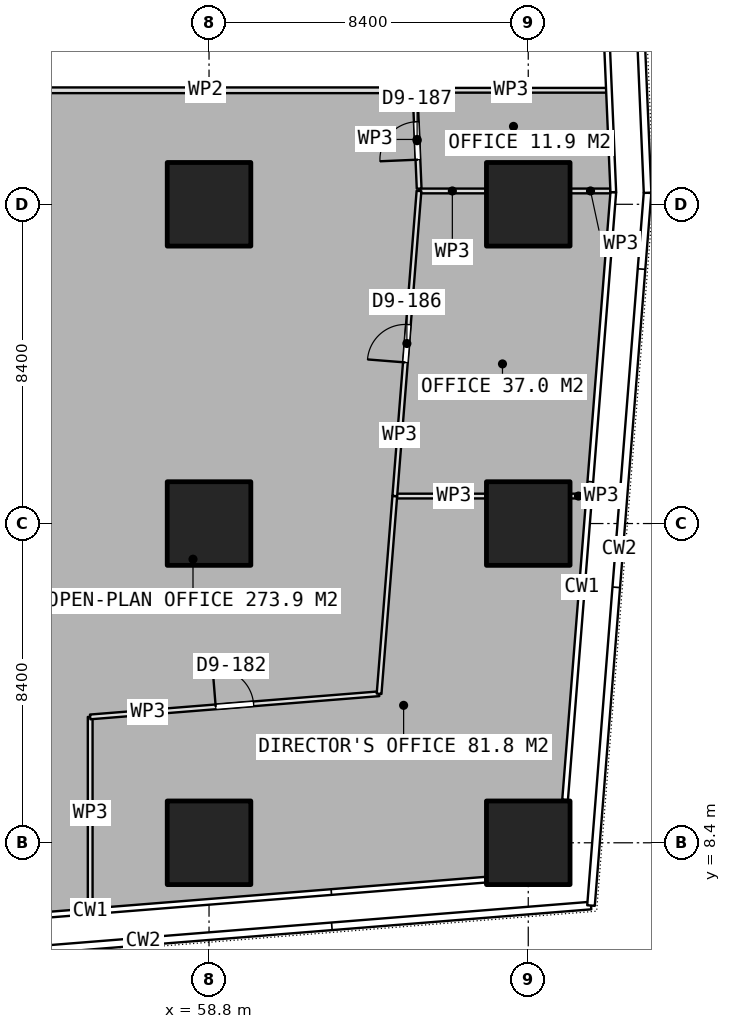
"""IFC4 building model, lengths in metres.
Left out: names, types, materials, properties, quantities, classifications, styles, units other than length and angle.
Written with IfcOpenShell. Run it as: python <this file> out.ifc"""

import sys

from ifc_helpers import new_model, si_unit, direction, frame, frame_2d, origin, origin_2d, place, context, subcontext, project, spatial, rectangle, extrude, element, fill, save


model = new_model("IFC4")
c1 = context("Model", 3, precision=1e-05, world=origin(), true_north=direction((0.0, 1.0)))
c2 = subcontext(c1, "Body", "Model", "MODEL_VIEW")
j1 = project(units=[si_unit("LENGTHUNIT", "METRE"), si_unit("PLANEANGLEUNIT", "RADIAN")], contexts=[c1])
p1 = place(None, origin())
s1 = spatial("IfcSite", under=j1, at=p1, CompositionType="ELEMENT")
p2 = place(p1, origin())
s2 = spatial("IfcBuilding", under=s1, at=p2, CompositionType="ELEMENT")
p3 = place(p2, frame((0.0, 0.0, 59.15)))
s3 = spatial("IfcBuildingStorey", under=s2, at=p3, CompositionType="ELEMENT", Elevation=59.15)
for number, where, z_axis, x_axis in (
    (1, (58.8, 8.4, 0.0), (0.0, 0.0, 1.0), (1.0, 0.0, 0.0)),
    (2, (58.8, 16.8, 0.0), (0.0, 0.0, 1.0), (1.0, 0.0, 0.0)),
    (3, (58.8, 25.2, 0.0), (0.0, 0.0, 1.0), (1.0, 0.0, 0.0)),
    (4, (67.2, 8.4, 0.0), (0.0, 0.0, 1.0), (1.0, 0.0, 0.0)),
    (5, (67.2, 16.8, 0.0), (0.0, 0.0, 1.0), (1.0, 0.0, 0.0)),
    (6, (67.2, 25.2, 0.0), (0.0, 0.0, 1.0), (1.0, 0.0, 0.0)),
):
    element("IfcColumn", number, at=place(p3, frame(where, z_axis=z_axis, x_axis=x_axis)), inside=s3, PredefinedType="COLUMN", context=c2, shape_type="SweptSolid", body=[
        extrude(rectangle(XDim=2.2, YDim=2.2, at=origin_2d()), origin(), (0.0, 0.0, 1.0), 3.75),
    ])
p4 = place(p3, frame((63.688, 17.523, 0.0), z_axis=(0.0, 0.0, 1.0), x_axis=(1.0, 0.0, 0.0)))
e7 = element("IfcWall", 7, at=p4, inside=s3, PredefinedType="PARTITIONING", context=c2, shape_type="SweptSolid", body=[
    extrude(rectangle(XDim=2.392, YDim=0.125, at=frame_2d((1.196, 0.0))), origin(), (0.0, 0.0, 1.0), 3.5),
])
p5 = place(p3, frame((68.32, 17.523, 0.0), z_axis=(0.0, 0.0, 1.0), x_axis=(1.0, 0.0, 0.0)))
e8 = element("IfcWall", 8, at=p5, inside=s3, PredefinedType="PARTITIONING", context=c2, shape_type="SweptSolid", body=[
    extrude(rectangle(XDim=0.403, YDim=0.125, at=frame_2d((0.201, 0.0))), origin(), (0.0, 0.0, 1.0), 3.5),
])
p6 = place(p3, frame((55.673, 6.676, 0.0), z_axis=(0.0, 0.0, 1.0), x_axis=(0.0, 1.0, 0.0)))
e9 = element("IfcWall", 9, at=p6, inside=s3, PredefinedType="PARTITIONING", context=c2, shape_type="SweptSolid", body=[
    extrude(rectangle(XDim=5.036, YDim=0.125, at=frame_2d((2.518, 0.0))), origin(), (0.0, 0.0, 1.0), 3.5),
])
p7 = place(p3, frame((55.673, 11.712, 0.0), z_axis=(0.0, 0.0, 1.0), x_axis=(0.99680498928, 0.079873733765, 0.0)))
e10 = element("IfcWall", 10, at=p7, inside=s3, PredefinedType="PARTITIONING", context=c2, shape_type="SweptSolid", body=[
    extrude(rectangle(XDim=7.626, YDim=0.125, at=frame_2d((3.813, 0.0))), origin(), (0.0, 0.0, 1.0), 3.5),
])
p8 = place(p7, frame((3.313, 0.0, 0.0)))
e11 = element("IfcOpeningElement", 11, at=p8, cuts=e10, PredefinedType="OPENING", context=c2, shape_type="SweptSolid", body=[
    extrude(rectangle(XDim=1.0, YDim=2.1, at=frame_2d((0.5, 1.05))), frame((0.0, 0.073, 0.0), z_axis=(0.0, -1.0, 0.0), x_axis=(1.0, 0.0, 0.0)), (0.0, 0.0, 1.0), 0.145),
])
p9 = place(p3, frame((63.275, 12.321, 0.0), z_axis=(0.0, 0.0, 1.0), x_axis=(0.079161317755, 0.996861818795, 0.0)))
e12 = element("IfcWall", 12, at=p9, inside=s3, PredefinedType="PARTITIONING", context=c2, shape_type="SweptSolid", body=[
    extrude(rectangle(XDim=5.218, YDim=0.125, at=frame_2d((2.609, 0.0))), origin(), (0.0, 0.0, 1.0), 3.5),
])
p10 = place(p3, frame((63.688, 17.524, 0.0), z_axis=(0.0, 0.0, 1.0), x_axis=(0.079102910118, 0.996866455254, 0.0)))
e13 = element("IfcWall", 13, at=p10, inside=s3, PredefinedType="PARTITIONING", context=c2, shape_type="SweptSolid", body=[
    extrude(rectangle(XDim=8.052, YDim=0.125, at=frame_2d((4.026, 0.0))), origin(), (0.0, 0.0, 1.0), 3.5),
])
p11 = place(p10, frame((3.526, 0.0, 0.0)))
e14 = element("IfcOpeningElement", 14, at=p11, cuts=e13, PredefinedType="OPENING", context=c2, shape_type="SweptSolid", body=[
    extrude(rectangle(XDim=1.0, YDim=2.1, at=frame_2d((0.5, 1.05))), frame((0.0, 0.073, 0.0), z_axis=(0.0, -1.0, 0.0), x_axis=(1.0, 0.0, 0.0)), (0.0, 0.0, 1.0), 0.145),
])
p12 = place(p3, frame((64.325, 25.551, 0.0), z_axis=(0.0, 0.0, 1.0), x_axis=(1.0, 0.0, 0.0)))
e15 = element("IfcWall", 15, at=p12, inside=s3, PredefinedType="PARTITIONING", context=c2, shape_type="SweptSolid", body=[
    extrude(rectangle(XDim=1.755, YDim=0.125, at=frame_2d((0.877, 0.0))), origin(), (0.0, 0.0, 1.0), 3.5),
])
p13 = place(p3, frame((68.32, 25.551, 0.0), z_axis=(0.0, 0.0, 1.0), x_axis=(1.0, 0.0, 0.0)))
e16 = element("IfcWall", 16, at=p13, inside=s3, PredefinedType="PARTITIONING", context=c2, shape_type="SweptSolid", body=[
    extrude(rectangle(XDim=1.037, YDim=0.125, at=frame_2d((0.519, 0.0))), origin(), (0.0, 0.0, 1.0), 3.5),
])
p14 = place(p3, frame((64.219, 28.2, 0.0), z_axis=(0.0, 0.0, 1.0), x_axis=(1.0, 0.0, 0.0)))
e17 = element("IfcWall", 17, at=p14, inside=s3, PredefinedType="PARTITIONING", context=c2, shape_type="SweptSolid", body=[
    extrude(rectangle(XDim=5.055, YDim=0.125, at=frame_2d((2.527, 0.0))), origin(), (0.0, 0.0, 1.0), 3.5),
])
p15 = place(p3, frame((64.329, 25.613, 0.0), z_axis=(0.0, 0.0, 1.0), x_axis=(-0.042524729329, 0.99909541456, 0.0)))
e18 = element("IfcWall", 18, at=p15, inside=s3, PredefinedType="PARTITIONING", context=c2, shape_type="SweptSolid", body=[
    extrude(rectangle(XDim=2.589, YDim=0.125, at=frame_2d((1.295, 0.0))), origin(), (0.0, 0.0, 1.0), 3.5),
])
p16 = place(p15, frame((0.762, 0.0, 0.0)))
e19 = element("IfcOpeningElement", 19, at=p16, cuts=e18, PredefinedType="OPENING", context=c2, shape_type="SweptSolid", body=[
    extrude(rectangle(XDim=1.0, YDim=2.1, at=frame_2d((0.5, 1.05))), frame((0.0, 0.073, 0.0), z_axis=(0.0, -1.0, 0.0), x_axis=(1.0, 0.0, 0.0)), (0.0, 0.0, 1.0), 0.145),
])
p17 = place(p3, frame((53.2, 28.2, 0.0), z_axis=(0.0, 0.0, 1.0), x_axis=(1.0, 0.0, 0.0)))
e20 = element("IfcWall", 20, at=p17, inside=s3, PredefinedType="PARTITIONING", context=c2, shape_type="SweptSolid", body=[
    extrude(rectangle(XDim=11.019, YDim=0.15, at=frame_2d((5.51, 0.0))), origin(), (0.0, 0.0, 1.0), 3.5),
])
p18 = place(p8, origin())
e21 = element("IfcDoor", 21, at=p18, inside=s3, OperationType="SINGLE_SWING_LEFT", PredefinedType="DOOR", context=c2, shape_type="SweptSolid", body=[
    extrude(rectangle(XDim=1.0, YDim=2.1, at=frame_2d((0.5, 1.05))), frame((0.0, 0.025, 0.0), z_axis=(0.0, -1.0, 0.0), x_axis=(1.0, 0.0, 0.0)), (0.0, 0.0, 1.0), 0.05),
])
fill(e11, e21)
p19 = place(p11, origin())
e22 = element("IfcDoor", 22, at=p19, inside=s3, OperationType="SINGLE_SWING_LEFT", PredefinedType="DOOR", context=c2, shape_type="SweptSolid", body=[
    extrude(rectangle(XDim=1.0, YDim=2.1, at=frame_2d((0.5, 1.05))), frame((0.0, 0.025, 0.0), z_axis=(0.0, -1.0, 0.0), x_axis=(1.0, 0.0, 0.0)), (0.0, 0.0, 1.0), 0.05),
])
fill(e14, e22)
p20 = place(p16, origin())
e23 = element("IfcDoor", 23, at=p20, inside=s3, OperationType="SINGLE_SWING_LEFT", PredefinedType="DOOR", context=c2, shape_type="SweptSolid", body=[
    extrude(rectangle(XDim=1.0, YDim=2.1, at=frame_2d((0.5, 1.05))), frame((0.0, 0.025, 0.0), z_axis=(0.0, -1.0, 0.0), x_axis=(1.0, 0.0, 0.0)), (0.0, 0.0, 1.0), 0.05),
])
fill(e19, e23)
save(model, sys.argv[1])
